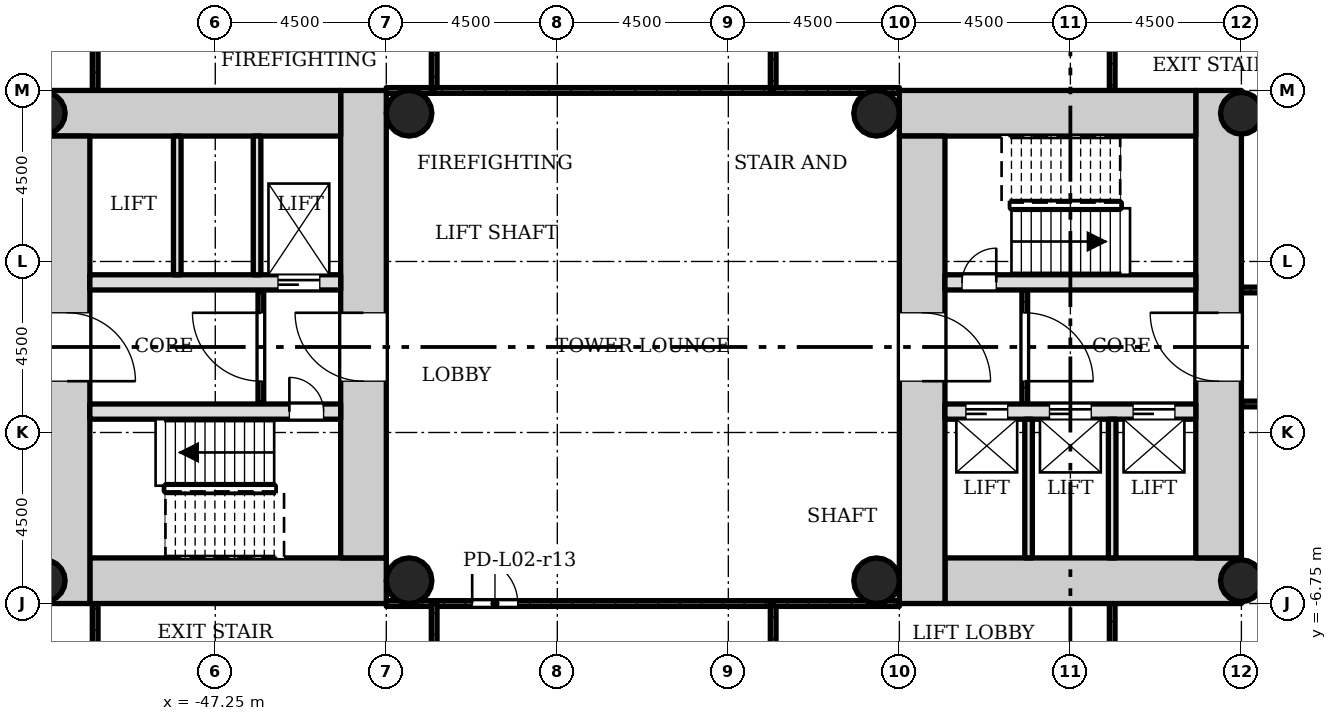
"""IFC4 building model, lengths in metres.
Left out: names, types, materials, properties, quantities, classifications, styles, units other than length and angle.
Written with IfcOpenShell. Run it as: python <this file> out.ifc"""

import sys

from ifc_helpers import new_model, si_unit, direction, frame, frame_2d, origin, origin_2d, place, context, subcontext, project, spatial, rectangle, hollow_circle, extrude, element, fill, save


model = new_model("IFC4")
c1 = context("Model", 3, precision=1e-05, world=origin(), true_north=direction((0.0, 1.0)))
c2 = subcontext(c1, "Body", "Model", "MODEL_VIEW")
j1 = project(units=[si_unit("LENGTHUNIT", "METRE"), si_unit("PLANEANGLEUNIT", "RADIAN")], contexts=[c1])
p1 = place(None, origin())
s1 = spatial("IfcSite", under=j1, at=p1, CompositionType="ELEMENT")
p2 = place(p1, origin())
s2 = spatial("IfcBuilding", under=s1, at=p2, CompositionType="ELEMENT")
p3 = place(p2, frame((0.0, 0.0, 11.0)))
s3 = spatial("IfcBuildingStorey", under=s2, at=p3, CompositionType="ELEMENT", Elevation=11.0)
p4 = place(p3, frame((-28.05, -6.15, 0.0), z_axis=(0.0, 0.0, 1.0), x_axis=(1.0, 0.0, 0.0)))
e1 = element("IfcWall", 1, at=p4, inside=s3, PredefinedType="SHEAR", context=c2, shape_type="SweptSolid", body=[
    extrude(rectangle(XDim=7.8, YDim=1.2, at=frame_2d((3.9, 0.0))), origin(), (0.0, 0.0, 1.0), 4.5),
])
p5 = place(p3, frame((-20.85, -5.55, 0.0), z_axis=(0.0, 0.0, 1.0), x_axis=(0.0, 1.0, 0.0)))
e2 = element("IfcWall", 2, at=p5, inside=s3, PredefinedType="SHEAR", context=c2, shape_type="SweptSolid", body=[
    extrude(rectangle(XDim=12.3, YDim=1.2, at=frame_2d((6.15, 0.0))), origin(), (0.0, 0.0, 1.0), 4.5),
])
p6 = place(p5, frame((4.65, 0.0, 0.0)))
e3 = element("IfcOpeningElement", 3, at=p6, cuts=e2, PredefinedType="OPENING", context=c2, shape_type="SweptSolid", body=[
    extrude(rectangle(XDim=1.8, YDim=2.1, at=frame_2d((0.9, 1.05))), frame((0.0, 0.61, 0.0), z_axis=(0.0, -1.0, 0.0), x_axis=(1.0, 0.0, 0.0)), (0.0, 0.0, 1.0), 1.22),
])
p7 = place(p3, frame((-21.45, 6.15, 0.0), z_axis=(0.0, 0.0, 1.0), x_axis=(-1.0, 0.0, 0.0)))
e4 = element("IfcWall", 4, at=p7, inside=s3, PredefinedType="SHEAR", context=c2, shape_type="SweptSolid", body=[
    extrude(rectangle(XDim=7.8, YDim=1.2, at=frame_2d((3.9, 0.0))), origin(), (0.0, 0.0, 1.0), 4.5),
])
p8 = place(p3, frame((-28.65, 5.55, 0.0), z_axis=(0.0, 0.0, 1.0), x_axis=(0.0, -1.0, 0.0)))
e5 = element("IfcWall", 5, at=p8, inside=s3, PredefinedType="SHEAR", context=c2, shape_type="SweptSolid", body=[
    extrude(rectangle(XDim=12.3, YDim=1.2, at=frame_2d((6.15, 0.0))), origin(), (0.0, 0.0, 1.0), 4.5),
])
p9 = place(p8, frame((4.65, 0.0, 0.0)))
e6 = element("IfcOpeningElement", 6, at=p9, cuts=e5, PredefinedType="OPENING", context=c2, shape_type="SweptSolid", body=[
    extrude(rectangle(XDim=1.8, YDim=2.1, at=frame_2d((0.9, 1.05))), frame((0.0, 0.61, 0.0), z_axis=(0.0, -1.0, 0.0), x_axis=(1.0, 0.0, 0.0)), (0.0, 0.0, 1.0), 1.22),
])
p10 = place(p3, frame((-28.05, -1.7, 0.0), z_axis=(0.0, 0.0, 1.0), x_axis=(1.0, 0.0, 0.0)))
e7 = element("IfcWall", 7, at=p10, inside=s3, PredefinedType="SHEAR", context=c2, shape_type="SweptSolid", body=[
    extrude(rectangle(XDim=6.6, YDim=0.4, at=frame_2d((3.3, 0.0))), origin(), (0.0, 0.0, 1.0), 4.5),
])
p11 = place(p10, frame((0.55, 0.0, 0.0)))
e8 = element("IfcOpeningElement", 8, at=p11, cuts=e7, PredefinedType="OPENING", context=c2, shape_type="SweptSolid", body=[
    extrude(rectangle(XDim=1.1, YDim=2.1, at=frame_2d((0.55, 1.05))), frame((0.0, 0.21, 0.0), z_axis=(0.0, -1.0, 0.0), x_axis=(1.0, 0.0, 0.0)), (0.0, 0.0, 1.0), 0.42),
])
p12 = place(p10, frame((2.75, 0.0, 0.0)))
e9 = element("IfcOpeningElement", 9, at=p12, cuts=e7, PredefinedType="OPENING", context=c2, shape_type="SweptSolid", body=[
    extrude(rectangle(XDim=1.1, YDim=2.1, at=frame_2d((0.55, 1.05))), frame((0.0, 0.21, 0.0), z_axis=(0.0, -1.0, 0.0), x_axis=(1.0, 0.0, 0.0)), (0.0, 0.0, 1.0), 0.42),
])
p13 = place(p10, frame((4.95, 0.0, 0.0)))
e10 = element("IfcOpeningElement", 10, at=p13, cuts=e7, PredefinedType="OPENING", context=c2, shape_type="SweptSolid", body=[
    extrude(rectangle(XDim=1.1, YDim=2.1, at=frame_2d((0.55, 1.05))), frame((0.0, 0.21, 0.0), z_axis=(0.0, -1.0, 0.0), x_axis=(1.0, 0.0, 0.0)), (0.0, 0.0, 1.0), 0.42),
])
p14 = place(p3, frame((-28.05, 1.7, 0.0), z_axis=(0.0, 0.0, 1.0), x_axis=(1.0, 0.0, 0.0)))
e11 = element("IfcWall", 11, at=p14, inside=s3, PredefinedType="SHEAR", context=c2, shape_type="SweptSolid", body=[
    extrude(rectangle(XDim=6.6, YDim=0.4, at=frame_2d((3.3, 0.0))), origin(), (0.0, 0.0, 1.0), 4.5),
])
p15 = place(p14, frame((0.45, 0.0, 0.0)))
e12 = element("IfcOpeningElement", 12, at=p15, cuts=e11, PredefinedType="OPENING", context=c2, shape_type="SweptSolid", body=[
    extrude(rectangle(XDim=0.9, YDim=2.1, at=frame_2d((0.45, 1.05))), frame((0.0, 0.21, 0.0), z_axis=(0.0, -1.0, 0.0), x_axis=(1.0, 0.0, 0.0)), (0.0, 0.0, 1.0), 0.42),
])
p16 = place(p3, frame((-50.55, -6.15, 0.0), z_axis=(0.0, 0.0, 1.0), x_axis=(1.0, 0.0, 0.0)))
e13 = element("IfcWall", 13, at=p16, inside=s3, PredefinedType="SHEAR", context=c2, shape_type="SweptSolid", body=[
    extrude(rectangle(XDim=7.8, YDim=1.2, at=frame_2d((3.9, 0.0))), origin(), (0.0, 0.0, 1.0), 4.5),
])
p17 = place(p3, frame((-43.35, -5.55, 0.0), z_axis=(0.0, 0.0, 1.0), x_axis=(0.0, 1.0, 0.0)))
e14 = element("IfcWall", 14, at=p17, inside=s3, PredefinedType="SHEAR", context=c2, shape_type="SweptSolid", body=[
    extrude(rectangle(XDim=12.3, YDim=1.2, at=frame_2d((6.15, 0.0))), origin(), (0.0, 0.0, 1.0), 4.5),
])
p18 = place(p17, frame((4.65, 0.0, 0.0)))
e15 = element("IfcOpeningElement", 15, at=p18, cuts=e14, PredefinedType="OPENING", context=c2, shape_type="SweptSolid", body=[
    extrude(rectangle(XDim=1.8, YDim=2.1, at=frame_2d((0.9, 1.05))), frame((0.0, 0.61, 0.0), z_axis=(0.0, -1.0, 0.0), x_axis=(1.0, 0.0, 0.0)), (0.0, 0.0, 1.0), 1.22),
])
p19 = place(p3, frame((-43.95, 6.15, 0.0), z_axis=(0.0, 0.0, 1.0), x_axis=(-1.0, 0.0, 0.0)))
e16 = element("IfcWall", 16, at=p19, inside=s3, PredefinedType="SHEAR", context=c2, shape_type="SweptSolid", body=[
    extrude(rectangle(XDim=7.8, YDim=1.2, at=frame_2d((3.9, 0.0))), origin(), (0.0, 0.0, 1.0), 4.5),
])
p20 = place(p3, frame((-51.15, 5.55, 0.0), z_axis=(0.0, 0.0, 1.0), x_axis=(0.0, -1.0, 0.0)))
e17 = element("IfcWall", 17, at=p20, inside=s3, PredefinedType="SHEAR", context=c2, shape_type="SweptSolid", body=[
    extrude(rectangle(XDim=12.3, YDim=1.2, at=frame_2d((6.15, 0.0))), origin(), (0.0, 0.0, 1.0), 4.5),
])
p21 = place(p20, frame((4.65, 0.0, 0.0)))
e18 = element("IfcOpeningElement", 18, at=p21, cuts=e17, PredefinedType="OPENING", context=c2, shape_type="SweptSolid", body=[
    extrude(rectangle(XDim=1.8, YDim=2.1, at=frame_2d((0.9, 1.05))), frame((0.0, 0.61, 0.0), z_axis=(0.0, -1.0, 0.0), x_axis=(1.0, 0.0, 0.0)), (0.0, 0.0, 1.0), 1.22),
])
p22 = place(p3, frame((-50.55, -1.7, 0.0), z_axis=(0.0, 0.0, 1.0), x_axis=(1.0, 0.0, 0.0)))
e19 = element("IfcWall", 19, at=p22, inside=s3, PredefinedType="SHEAR", context=c2, shape_type="SweptSolid", body=[
    extrude(rectangle(XDim=6.6, YDim=0.4, at=frame_2d((3.3, 0.0))), origin(), (0.0, 0.0, 1.0), 4.5),
])
p23 = place(p22, frame((5.25, 0.0, 0.0)))
e20 = element("IfcOpeningElement", 20, at=p23, cuts=e19, PredefinedType="OPENING", context=c2, shape_type="SweptSolid", body=[
    extrude(rectangle(XDim=0.9, YDim=2.1, at=frame_2d((0.45, 1.05))), frame((0.0, 0.21, 0.0), z_axis=(0.0, -1.0, 0.0), x_axis=(1.0, 0.0, 0.0)), (0.0, 0.0, 1.0), 0.42),
])
p24 = place(p3, frame((-50.55, 1.7, 0.0), z_axis=(0.0, 0.0, 1.0), x_axis=(1.0, 0.0, 0.0)))
e21 = element("IfcWall", 21, at=p24, inside=s3, PredefinedType="SHEAR", context=c2, shape_type="SweptSolid", body=[
    extrude(rectangle(XDim=6.6, YDim=0.4, at=frame_2d((3.3, 0.0))), origin(), (0.0, 0.0, 1.0), 4.5),
])
p25 = place(p24, frame((4.95, 0.0, 0.0)))
e22 = element("IfcOpeningElement", 22, at=p25, cuts=e21, PredefinedType="OPENING", context=c2, shape_type="SweptSolid", body=[
    extrude(rectangle(XDim=1.1, YDim=2.1, at=frame_2d((0.55, 1.05))), frame((0.0, 0.21, 0.0), z_axis=(0.0, -1.0, 0.0), x_axis=(1.0, 0.0, 0.0)), (0.0, 0.0, 1.0), 0.42),
])
for number, where, z_axis, x_axis in (
    (23, (-20.25, -6.15, 0.0), (0.0, 0.0, 1.0), (1.0, 0.0, 0.0)),
    (24, (-20.25, 6.15, 0.0), (0.0, 0.0, 1.0), (1.0, 0.0, 0.0)),
    (25, (-51.75, -6.15, 0.0), (0.0, 0.0, 1.0), (1.0, 0.0, 0.0)),
    (26, (-51.75, 6.15, 0.0), (0.0, 0.0, 1.0), (1.0, 0.0, 0.0)),
):
    element("IfcColumn", number, at=place(p3, frame(where, z_axis=z_axis, x_axis=x_axis)), inside=s3, PredefinedType="COLUMN", context=c2, shape_type="SweptSolid", body=[
        extrude(hollow_circle(Radius=0.55, WallThickness=0.04, at=origin_2d()), origin(), (0.0, 0.0, 1.0), 4.5),
    ])
for number, where, z_axis, x_axis in (
    (27, (-42.15, -6.15, 0.0), (0.0, 0.0, 1.0), (1.0, 0.0, 0.0)),
    (28, (-29.85, -6.15, 0.0), (0.0, 0.0, 1.0), (1.0, 0.0, 0.0)),
    (29, (-29.85, 6.15, 0.0), (0.0, 0.0, 1.0), (1.0, 0.0, 0.0)),
    (30, (-42.15, 6.15, 0.0), (0.0, 0.0, 1.0), (1.0, 0.0, 0.0)),
):
    element("IfcColumn", number, at=place(p3, frame(where, z_axis=z_axis, x_axis=x_axis)), inside=s3, PredefinedType="COLUMN", context=c2, shape_type="SweptSolid", body=[
        extrude(hollow_circle(Radius=0.6, WallThickness=0.045, at=origin_2d()), origin(), (0.0, 0.0, 1.0), 4.5),
    ])
p26 = place(p3, frame((-25.95, -1.5, 0.0), z_axis=(0.0, 0.0, 1.0), x_axis=(0.0, 1.0, 0.0)))
e31 = element("IfcWall", 31, at=p26, inside=s3, PredefinedType="PARTITIONING", context=c2, shape_type="SweptSolid", body=[
    extrude(rectangle(XDim=3.0, YDim=0.15, at=frame_2d((1.5, 0.0))), origin(), (0.0, 0.0, 1.0), 4.08),
])
p27 = place(p26, frame((0.6, 0.0, 0.0)))
e32 = element("IfcOpeningElement", 32, at=p27, cuts=e31, PredefinedType="OPENING", context=c2, shape_type="SweptSolid", body=[
    extrude(rectangle(XDim=1.8, YDim=2.1, at=frame_2d((0.9, 1.05))), frame((0.0, 0.085, 0.0), z_axis=(0.0, -1.0, 0.0), x_axis=(1.0, 0.0, 0.0)), (0.0, 0.0, 1.0), 0.17),
])
for number, where, z_axis, x_axis in (
    (33, (-25.85, -5.55, 0.0), (0.0, 0.0, 1.0), (0.0, 1.0, 0.0)),
    (34, (-23.65, -5.55, 0.0), (0.0, 0.0, 1.0), (0.0, 1.0, 0.0)),
):
    element("IfcWall", number, at=place(p3, frame(where, z_axis=z_axis, x_axis=x_axis)), inside=s3, PredefinedType="SOLIDWALL", context=c2, shape_type="SweptSolid", body=[
        extrude(rectangle(XDim=3.65, YDim=0.2, at=frame_2d((1.825, 0.0))), origin(), (0.0, 0.0, 1.0), 4.08),
    ])
p28 = place(p3, frame((-46.05, 1.5, 0.0), z_axis=(0.0, 0.0, 1.0), x_axis=(0.0, -1.0, 0.0)))
e35 = element("IfcWall", 35, at=p28, inside=s3, PredefinedType="PARTITIONING", context=c2, shape_type="SweptSolid", body=[
    extrude(rectangle(XDim=3.0, YDim=0.15, at=frame_2d((1.5, 0.0))), origin(), (0.0, 0.0, 1.0), 4.08),
])
p29 = place(p28, frame((0.6, 0.0, 0.0)))
e36 = element("IfcOpeningElement", 36, at=p29, cuts=e35, PredefinedType="OPENING", context=c2, shape_type="SweptSolid", body=[
    extrude(rectangle(XDim=1.8, YDim=2.1, at=frame_2d((0.9, 1.05))), frame((0.0, 0.085, 0.0), z_axis=(0.0, -1.0, 0.0), x_axis=(1.0, 0.0, 0.0)), (0.0, 0.0, 1.0), 0.17),
])
for number, where, z_axis, x_axis in (
    (37, (-46.15, 5.55, 0.0), (0.0, 0.0, 1.0), (0.0, -1.0, 0.0)),
    (38, (-48.25, 5.55, 0.0), (0.0, 0.0, 1.0), (0.0, -1.0, 0.0)),
):
    element("IfcWall", number, at=place(p3, frame(where, z_axis=z_axis, x_axis=x_axis)), inside=s3, PredefinedType="SOLIDWALL", context=c2, shape_type="SweptSolid", body=[
        extrude(rectangle(XDim=3.65, YDim=0.2, at=frame_2d((1.825, 0.0))), origin(), (0.0, 0.0, 1.0), 4.08),
    ])
p30 = place(p3, frame((-50.41, -6.75, 0.0), z_axis=(0.0, 0.0, 1.0), x_axis=(0.0, -1.0, 0.0)))
e39 = element("IfcWall", 39, at=p30, inside=s3, PredefinedType="PARTITIONING", context=c2, shape_type="SweptSolid", body=[
    extrude(rectangle(XDim=16.75, YDim=0.15, at=frame_2d((8.375, 0.0))), origin(), (0.0, 0.0, 1.0), 4.08),
])
for number, where, z_axis, x_axis in (
    (40, (-42.75, -6.75, 0.0), (0.0, 0.0, 1.0), (1.0, 0.0, 0.0)),
    (41, (-41.49, 6.75, 0.0), (0.0, 0.0, 1.0), (-1.0, 0.0, 0.0)),
):
    element("IfcWall", number, at=place(p3, frame(where, z_axis=z_axis, x_axis=x_axis)), inside=s3, PredefinedType="PARTITIONING", context=c2, shape_type="SweptSolid", body=[
        extrude(rectangle(XDim=1.26, YDim=0.15, at=frame_2d((0.63, 0.0))), origin(), (0.0, 0.0, 1.0), 4.08),
    ])
for number, where, z_axis, x_axis in (
    (42, (-50.41, 6.75, 0.0), (0.0, 0.0, 1.0), (0.0, 1.0, 0.0)),
    (43, (-41.49, 26.5, 0.0), (0.0, 0.0, 1.0), (0.0, -1.0, 0.0)),
):
    element("IfcWall", number, at=place(p3, frame(where, z_axis=z_axis, x_axis=x_axis)), inside=s3, PredefinedType="PARTITIONING", context=c2, shape_type="SweptSolid", body=[
        extrude(rectangle(XDim=19.75, YDim=0.15, at=frame_2d((9.875, 0.0))), origin(), (0.0, 0.0, 1.0), 4.08),
    ])
p31 = place(p3, frame((-41.49, -6.75, 0.0), z_axis=(0.0, 0.0, 1.0), x_axis=(1.0, 0.0, 0.0)))
e44 = element("IfcWall", 44, at=p31, inside=s3, PredefinedType="PARTITIONING", context=c2, shape_type="SweptSolid", body=[
    extrude(rectangle(XDim=8.92, YDim=0.15, at=frame_2d((4.46, 0.0))), origin(), (0.0, 0.0, 1.0), 4.08),
])
p32 = place(p31, frame((1.0, 0.0, 0.0)))
e45 = element("IfcOpeningElement", 45, at=p32, cuts=e44, PredefinedType="OPENING", context=c2, shape_type="SweptSolid", body=[
    extrude(rectangle(XDim=1.2, YDim=2.1, at=frame_2d((0.6, 1.05))), frame((0.0, 0.085, 0.0), z_axis=(0.0, -1.0, 0.0), x_axis=(1.0, 0.0, 0.0)), (0.0, 0.0, 1.0), 0.17),
])
for number, where, z_axis, x_axis in (
    (46, (-41.49, -23.5, 0.0), (0.0, 0.0, 1.0), (0.0, 1.0, 0.0)),
    (47, (-32.57, -6.75, 0.0), (0.0, 0.0, 1.0), (0.0, -1.0, 0.0)),
):
    element("IfcWall", number, at=place(p3, frame(where, z_axis=z_axis, x_axis=x_axis)), inside=s3, PredefinedType="PARTITIONING", context=c2, shape_type="SweptSolid", body=[
        extrude(rectangle(XDim=16.75, YDim=0.15, at=frame_2d((8.375, 0.0))), origin(), (0.0, 0.0, 1.0), 4.08),
    ])
p33 = place(p3, frame((-32.57, 6.75, 0.0), z_axis=(0.0, 0.0, 1.0), x_axis=(-1.0, 0.0, 0.0)))
e48 = element("IfcWall", 48, at=p33, inside=s3, PredefinedType="PARTITIONING", context=c2, shape_type="SweptSolid", body=[
    extrude(rectangle(XDim=8.92, YDim=0.15, at=frame_2d((4.46, 0.0))), origin(), (0.0, 0.0, 1.0), 4.08),
])
p34 = place(p3, frame((-32.57, 26.5, 0.0), z_axis=(0.0, 0.0, 1.0), x_axis=(0.0, -1.0, 0.0)))
e49 = element("IfcWall", 49, at=p34, inside=s3, PredefinedType="PARTITIONING", context=c2, shape_type="SweptSolid", body=[
    extrude(rectangle(XDim=19.75, YDim=0.15, at=frame_2d((9.875, 0.0))), origin(), (0.0, 0.0, 1.0), 4.08),
])
p35 = place(p3, frame((-32.57, -6.75, 0.0), z_axis=(0.0, 0.0, 1.0), x_axis=(1.0, 0.0, 0.0)))
e50 = element("IfcWall", 50, at=p35, inside=s3, PredefinedType="PARTITIONING", context=c2, shape_type="SweptSolid", body=[
    extrude(rectangle(XDim=3.32, YDim=0.15, at=frame_2d((1.66, 0.0))), origin(), (0.0, 0.0, 1.0), 4.08),
])
p36 = place(p3, frame((-23.65, -6.75, 0.0), z_axis=(0.0, 0.0, 1.0), x_axis=(0.0, -1.0, 0.0)))
e51 = element("IfcWall", 51, at=p36, inside=s3, PredefinedType="PARTITIONING", context=c2, shape_type="SweptSolid", body=[
    extrude(rectangle(XDim=16.75, YDim=0.15, at=frame_2d((8.375, 0.0))), origin(), (0.0, 0.0, 1.0), 4.08),
])
p37 = place(p3, frame((-29.25, 6.75, 0.0), z_axis=(0.0, 0.0, 1.0), x_axis=(-1.0, 0.0, 0.0)))
e52 = element("IfcWall", 52, at=p37, inside=s3, PredefinedType="PARTITIONING", context=c2, shape_type="SweptSolid", body=[
    extrude(rectangle(XDim=3.32, YDim=0.15, at=frame_2d((1.66, 0.0))), origin(), (0.0, 0.0, 1.0), 4.08),
])
p38 = place(p3, frame((-23.65, 26.5, 0.0), z_axis=(0.0, 0.0, 1.0), x_axis=(0.0, -1.0, 0.0)))
e53 = element("IfcWall", 53, at=p38, inside=s3, PredefinedType="PARTITIONING", context=c2, shape_type="SweptSolid", body=[
    extrude(rectangle(XDim=19.75, YDim=0.15, at=frame_2d((9.875, 0.0))), origin(), (0.0, 0.0, 1.0), 4.08),
])
for number, where, z_axis, x_axis in (
    (54, (-20.25, -1.5, 0.0), (0.0, 0.0, 1.0), (1.0, 0.0, 0.0)),
    (55, (-14.73, 1.5, 0.0), (0.0, 0.0, 1.0), (-1.0, 0.0, 0.0)),
):
    element("IfcWall", number, at=place(p3, frame(where, z_axis=z_axis, x_axis=x_axis)), inside=s3, PredefinedType="PARTITIONING", context=c2, shape_type="SweptSolid", body=[
        extrude(rectangle(XDim=5.52, YDim=0.15, at=frame_2d((2.76, 0.0))), origin(), (0.0, 0.0, 1.0), 4.08),
    ])
p39 = place(p27, origin())
e56 = element("IfcDoor", 56, at=p39, inside=s3, OperationType="SINGLE_SWING_LEFT", PredefinedType="DOOR", context=c2, shape_type="SweptSolid", body=[
    extrude(rectangle(XDim=1.8, YDim=2.1, at=frame_2d((0.9, 1.05))), frame((0.0, 0.025, 0.0), z_axis=(0.0, -1.0, 0.0), x_axis=(1.0, 0.0, 0.0)), (0.0, 0.0, 1.0), 0.05),
])
fill(e32, e56)
p40 = place(p29, origin())
e57 = element("IfcDoor", 57, at=p40, inside=s3, OperationType="SINGLE_SWING_LEFT", PredefinedType="DOOR", context=c2, shape_type="SweptSolid", body=[
    extrude(rectangle(XDim=1.8, YDim=2.1, at=frame_2d((0.9, 1.05))), frame((0.0, 0.025, 0.0), z_axis=(0.0, -1.0, 0.0), x_axis=(1.0, 0.0, 0.0)), (0.0, 0.0, 1.0), 0.05),
])
fill(e36, e57)
p41 = place(p32, origin())
e58 = element("IfcDoor", 58, at=p41, inside=s3, OperationType="SINGLE_SWING_RIGHT", PredefinedType="DOOR", context=c2, shape_type="SweptSolid", body=[
    extrude(rectangle(XDim=1.2, YDim=2.1, at=frame_2d((0.6, 1.05))), frame((0.0, 0.025, 0.0), z_axis=(0.0, -1.0, 0.0), x_axis=(1.0, 0.0, 0.0)), (0.0, 0.0, 1.0), 0.05),
])
fill(e45, e58)
p42 = place(p15, origin())
e59 = element("IfcDoor", 59, at=p42, inside=s3, OperationType="SINGLE_SWING_LEFT", PredefinedType="DOOR", context=c2, shape_type="SweptSolid", body=[
    extrude(rectangle(XDim=0.9, YDim=2.1, at=frame_2d((0.45, 1.05))), frame((0.0, 0.025, 0.0), z_axis=(0.0, -1.0, 0.0), x_axis=(1.0, 0.0, 0.0)), (0.0, 0.0, 1.0), 0.05),
])
fill(e12, e59)
p43 = place(p11, origin())
e60 = element("IfcDoor", 60, at=p43, inside=s3, OperationType="SLIDING_TO_LEFT", PredefinedType="DOOR", context=c2, shape_type="SweptSolid", body=[
    extrude(rectangle(XDim=1.1, YDim=2.1, at=frame_2d((0.55, 1.05))), frame((0.0, 0.025, 0.0), z_axis=(0.0, -1.0, 0.0), x_axis=(1.0, 0.0, 0.0)), (0.0, 0.0, 1.0), 0.05),
])
fill(e8, e60)
p44 = place(p12, origin())
e61 = element("IfcDoor", 61, at=p44, inside=s3, OperationType="SLIDING_TO_LEFT", PredefinedType="DOOR", context=c2, shape_type="SweptSolid", body=[
    extrude(rectangle(XDim=1.1, YDim=2.1, at=frame_2d((0.55, 1.05))), frame((0.0, 0.025, 0.0), z_axis=(0.0, -1.0, 0.0), x_axis=(1.0, 0.0, 0.0)), (0.0, 0.0, 1.0), 0.05),
])
fill(e9, e61)
p45 = place(p13, origin())
e62 = element("IfcDoor", 62, at=p45, inside=s3, OperationType="SLIDING_TO_LEFT", PredefinedType="DOOR", context=c2, shape_type="SweptSolid", body=[
    extrude(rectangle(XDim=1.1, YDim=2.1, at=frame_2d((0.55, 1.05))), frame((0.0, 0.025, 0.0), z_axis=(0.0, -1.0, 0.0), x_axis=(1.0, 0.0, 0.0)), (0.0, 0.0, 1.0), 0.05),
])
fill(e10, e62)
p46 = place(p9, origin())
e63 = element("IfcDoor", 63, at=p46, inside=s3, OperationType="SINGLE_SWING_LEFT", PredefinedType="DOOR", context=c2, shape_type="SweptSolid", body=[
    extrude(rectangle(XDim=1.8, YDim=2.1, at=frame_2d((0.9, 1.05))), frame((0.0, 0.025, 0.0), z_axis=(0.0, -1.0, 0.0), x_axis=(1.0, 0.0, 0.0)), (0.0, 0.0, 1.0), 0.05),
])
fill(e6, e63)
p47 = place(p6, origin())
e64 = element("IfcDoor", 64, at=p47, inside=s3, OperationType="SINGLE_SWING_LEFT", PredefinedType="DOOR", context=c2, shape_type="SweptSolid", body=[
    extrude(rectangle(XDim=1.8, YDim=2.1, at=frame_2d((0.9, 1.05))), frame((0.0, 0.025, 0.0), z_axis=(0.0, -1.0, 0.0), x_axis=(1.0, 0.0, 0.0)), (0.0, 0.0, 1.0), 0.05),
])
fill(e3, e64)
p48 = place(p23, origin())
e65 = element("IfcDoor", 65, at=p48, inside=s3, OperationType="SINGLE_SWING_RIGHT", PredefinedType="DOOR", context=c2, shape_type="SweptSolid", body=[
    extrude(rectangle(XDim=0.9, YDim=2.1, at=frame_2d((0.45, 1.05))), frame((0.0, 0.025, 0.0), z_axis=(0.0, -1.0, 0.0), x_axis=(1.0, 0.0, 0.0)), (0.0, 0.0, 1.0), 0.05),
])
fill(e20, e65)
p49 = place(p25, origin())
e66 = element("IfcDoor", 66, at=p49, inside=s3, OperationType="SLIDING_TO_LEFT", PredefinedType="DOOR", context=c2, shape_type="SweptSolid", body=[
    extrude(rectangle(XDim=1.1, YDim=2.1, at=frame_2d((0.55, 1.05))), frame((0.0, 0.025, 0.0), z_axis=(0.0, -1.0, 0.0), x_axis=(1.0, 0.0, 0.0)), (0.0, 0.0, 1.0), 0.05),
])
fill(e22, e66)
p50 = place(p18, origin())
e67 = element("IfcDoor", 67, at=p50, inside=s3, OperationType="SINGLE_SWING_LEFT", PredefinedType="DOOR", context=c2, shape_type="SweptSolid", body=[
    extrude(rectangle(XDim=1.8, YDim=2.1, at=frame_2d((0.9, 1.05))), frame((0.0, 0.025, 0.0), z_axis=(0.0, -1.0, 0.0), x_axis=(1.0, 0.0, 0.0)), (0.0, 0.0, 1.0), 0.05),
])
fill(e15, e67)
p51 = place(p21, origin())
e68 = element("IfcDoor", 68, at=p51, inside=s3, OperationType="SINGLE_SWING_LEFT", PredefinedType="DOOR", context=c2, shape_type="SweptSolid", body=[
    extrude(rectangle(XDim=1.8, YDim=2.1, at=frame_2d((0.9, 1.05))), frame((0.0, 0.025, 0.0), z_axis=(0.0, -1.0, 0.0), x_axis=(1.0, 0.0, 0.0)), (0.0, 0.0, 1.0), 0.05),
])
fill(e18, e68)
save(model, sys.argv[1])
